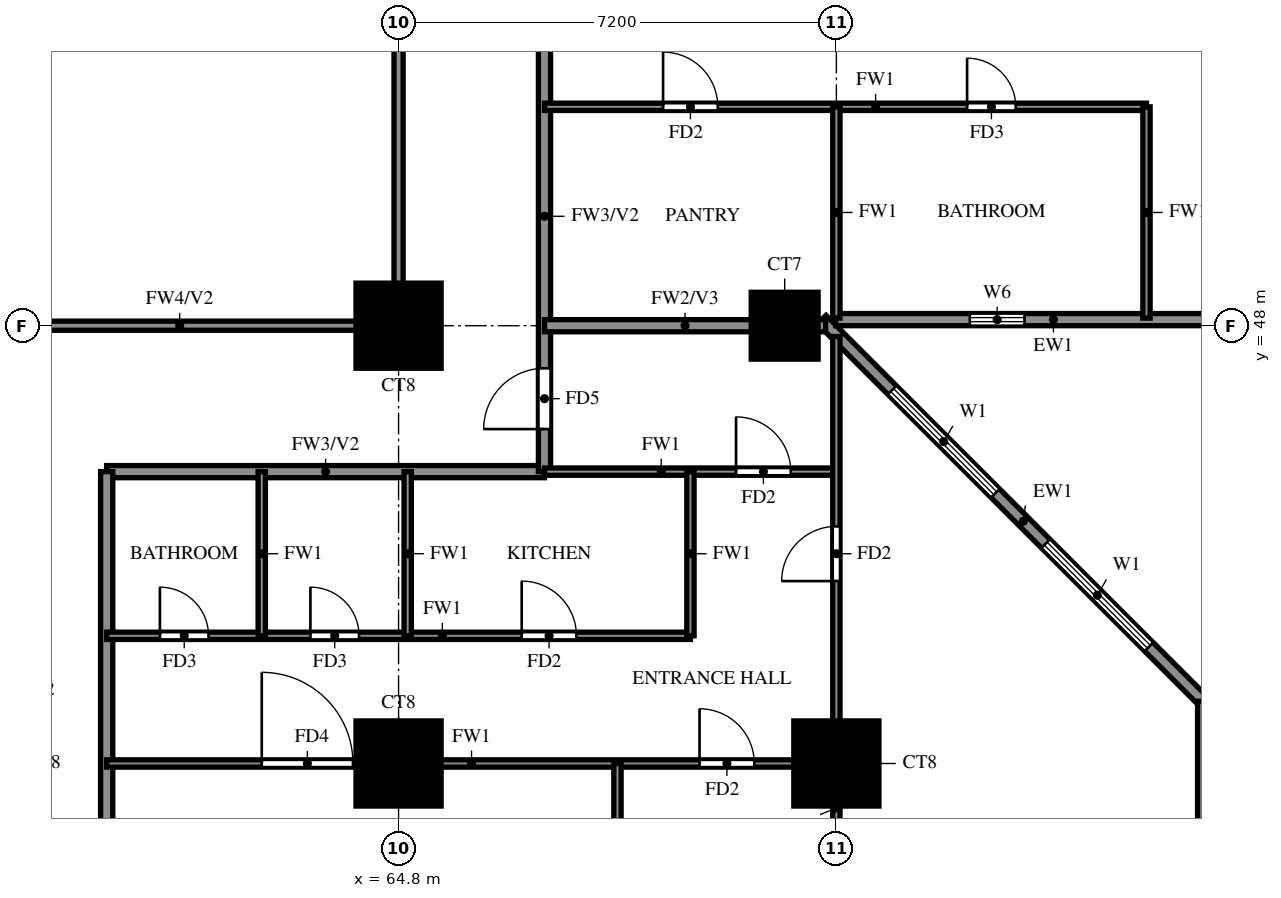
"""IFC4 building model, lengths in metres.
Left out: names, types, materials, properties, quantities, classifications, styles, units other than length and angle.
Written with IfcOpenShell. Run it as: python <this file> out.ifc"""

import sys

from ifc_helpers import new_model, si_unit, direction, frame, frame_2d, origin, origin_2d, place, context, subcontext, project, spatial, rectangle, extrude, source, transform, mapped, element, fill, save


model = new_model("IFC4")
c1 = context("Model", 3, precision=1e-05, world=origin(), true_north=direction((0.0, 1.0)))
c2 = subcontext(c1, "Body", "Model", "MODEL_VIEW")
j1 = project(units=[si_unit("LENGTHUNIT", "METRE"), si_unit("PLANEANGLEUNIT", "RADIAN")], contexts=[c1])
p1 = place(None, origin())
s1 = spatial("IfcSite", under=j1, at=p1, CompositionType="ELEMENT")
p2 = place(p1, origin())
s2 = spatial("IfcBuilding", under=s1, at=p2, CompositionType="ELEMENT")
p3 = place(p2, frame((0.0, 0.0, 55.0)))
s3 = spatial("IfcBuildingStorey", under=s2, at=p3, CompositionType="ELEMENT", Elevation=55.0)
m1 = source(origin(), c2, "Body", "SweptSolid", [
    extrude(rectangle(XDim=1.4, YDim=1.4, at=origin_2d()), origin(), (0.0, 0.0, 1.0), 3.18),
])
for number, where, z_axis, x_axis in (
    (1, (64.8, 40.8, 0.0), (0.0, 0.0, 1.0), (1.0, 0.0, 0.0)),
    (2, (72.0, 40.8, 0.0), (0.0, 0.0, 1.0), (1.0, 0.0, 0.0)),
    (3, (64.8, 48.0, 0.0), (0.0, 0.0, 1.0), (1.0, 0.0, 0.0)),
):
    element("IfcColumn", number, at=place(p3, frame(where, z_axis=z_axis, x_axis=x_axis)), inside=s3, PredefinedType="COLUMN", context=c2, shape_type="MappedRepresentation", body=[
        mapped(m1, transform((0.0, 0.0, 0.0))),
    ])
m2 = source(origin(), c2, "Body", "SweptSolid", [
    extrude(rectangle(XDim=1.1, YDim=1.1, at=origin_2d()), origin(), (0.0, 0.0, 1.0), 3.18),
])
p4 = place(p3, frame((71.15, 48.0, 0.0), z_axis=(0.0, 0.0, 1.0), x_axis=(1.0, 0.0, 0.0)))
e4 = element("IfcColumn", 4, at=p4, inside=s3, PredefinedType="COLUMN", context=c2, shape_type="MappedRepresentation", body=[
    mapped(m2, transform((0.0, 0.0, 0.0))),
])
p5 = place(p3, frame((78.74, 41.118, 0.0), z_axis=(0.0, 0.0, 1.0), x_axis=(-0.707106781187, 0.707106781187, 0.0)))
e5 = element("IfcWall", 5, at=p5, inside=s3, PredefinedType="SOLIDWALL", context=c2, shape_type="SweptSolid", body=[
    extrude(rectangle(XDim=9.874, YDim=0.2, at=frame_2d((4.937, 0.0))), origin(), (0.0, 0.0, 1.0), 3.18),
])
p6 = place(p5, frame((2.264, 0.0, 0.6)))
e6 = element("IfcOpeningElement", 6, at=p6, cuts=e5, PredefinedType="OPENING", context=c2, shape_type="SweptSolid", body=[
    extrude(rectangle(XDim=2.4, YDim=2.4, at=frame_2d((1.2, 1.2))), frame((0.0, 0.11, 0.0), z_axis=(0.0, -1.0, 0.0), x_axis=(1.0, 0.0, 0.0)), (0.0, 0.0, 1.0), 0.22),
])
p7 = place(p5, frame((5.836, 0.0, 0.6)))
e7 = element("IfcOpeningElement", 7, at=p7, cuts=e5, PredefinedType="OPENING", context=c2, shape_type="SweptSolid", body=[
    extrude(rectangle(XDim=2.4, YDim=2.4, at=frame_2d((1.2, 1.2))), frame((0.0, 0.11, 0.0), z_axis=(0.0, -1.0, 0.0), x_axis=(1.0, 0.0, 0.0)), (0.0, 0.0, 1.0), 0.22),
])
p8 = place(p3, frame((71.989, 48.1, 0.0), z_axis=(0.0, 0.0, 1.0), x_axis=(1.0, 0.0, 0.0)))
e8 = element("IfcWall", 8, at=p8, inside=s3, PredefinedType="SOLIDWALL", context=c2, shape_type="SweptSolid", body=[
    extrude(rectangle(XDim=6.511, YDim=0.2, at=frame_2d((3.256, 0.0))), origin(), (0.0, 0.0, 1.0), 3.18),
])
p9 = place(p8, frame((2.206, 0.0, 1.5)))
e9 = element("IfcOpeningElement", 9, at=p9, cuts=e8, PredefinedType="OPENING", context=c2, shape_type="SweptSolid", body=[
    extrude(rectangle(XDim=0.9, YDim=0.9, at=frame_2d((0.45, 0.45))), frame((0.0, 0.11, 0.0), z_axis=(0.0, -1.0, 0.0), x_axis=(1.0, 0.0, 0.0)), (0.0, 0.0, 1.0), 0.22),
])
p10 = place(p3, frame((60.0, 45.6, 0.0), z_axis=(0.0, 0.0, 1.0), x_axis=(1.0, 0.0, 0.0)))
e10 = element("IfcWall", 10, at=p10, inside=s3, PredefinedType="SOLIDWALL", context=c2, shape_type="SweptSolid", body=[
    extrude(rectangle(XDim=7.2, YDim=0.2, at=frame_2d((3.6, 0.0))), origin(), (0.0, 0.0, 1.0), 3.18),
])
p11 = place(p3, frame((60.0, 33.725, 0.0), z_axis=(0.0, 0.0, 1.0), x_axis=(0.0, 1.0, 0.0)))
e11 = element("IfcWall", 11, at=p11, inside=s3, PredefinedType="SOLIDWALL", context=c2, shape_type="SweptSolid", body=[
    extrude(rectangle(XDim=11.875, YDim=0.2, at=frame_2d((5.938, 0.0))), origin(), (0.0, 0.0, 1.0), 2.28),
])
p12 = place(p3, frame((67.2, 45.6, 0.0), z_axis=(0.0, 0.0, 1.0), x_axis=(0.0, 1.0, 0.0)))
e12 = element("IfcWall", 12, at=p12, inside=s3, PredefinedType="SOLIDWALL", context=c2, shape_type="SweptSolid", body=[
    extrude(rectangle(XDim=8.4, YDim=0.2, at=frame_2d((4.2, 0.0))), origin(), (0.0, 0.0, 1.0), 3.18),
])
p13 = place(p12, frame((0.7, 0.0, 0.0)))
e13 = element("IfcOpeningElement", 13, at=p13, cuts=e12, PredefinedType="OPENING", context=c2, shape_type="SweptSolid", body=[
    extrude(rectangle(XDim=1.0, YDim=2.1, at=frame_2d((0.5, 1.05))), frame((0.0, 0.11, 0.0), z_axis=(0.0, -1.0, 0.0), x_axis=(1.0, 0.0, 0.0)), (0.0, 0.0, 1.0), 0.22),
])
p14 = place(p3, frame((67.2, 48.0, 0.0), z_axis=(0.0, 0.0, 1.0), x_axis=(1.0, 0.0, 0.0)))
e14 = element("IfcWall", 14, at=p14, inside=s3, PredefinedType="SOLIDWALL", context=c2, shape_type="SweptSolid", body=[
    extrude(rectangle(XDim=4.623, YDim=0.2, at=frame_2d((2.312, 0.0))), origin(), (0.0, 0.0, 1.0), 3.18),
])
p15 = place(p3, frame((60.0, 40.8, 0.0), z_axis=(0.0, 0.0, 1.0), x_axis=(1.0, 0.0, 0.0)))
e15 = element("IfcWall", 15, at=p15, inside=s3, PredefinedType="PARTITIONING", context=c2, shape_type="SweptSolid", body=[
    extrude(rectangle(XDim=12.0, YDim=0.12, at=frame_2d((6.0, 0.0))), origin(), (0.0, 0.0, 1.0), 3.18),
])
p16 = place(p15, frame((9.75, 0.0, 0.0)))
e16 = element("IfcOpeningElement", 16, at=p16, cuts=e15, PredefinedType="OPENING", context=c2, shape_type="SweptSolid", body=[
    extrude(rectangle(XDim=0.9, YDim=2.1, at=frame_2d((0.45, 1.05))), frame((0.0, 0.07, 0.0), z_axis=(0.0, -1.0, 0.0), x_axis=(1.0, 0.0, 0.0)), (0.0, 0.0, 1.0), 0.14),
])
p17 = place(p15, frame((2.55, 0.0, 0.0)))
e17 = element("IfcOpeningElement", 17, at=p17, cuts=e15, PredefinedType="OPENING", context=c2, shape_type="SweptSolid", body=[
    extrude(rectangle(XDim=1.5, YDim=2.1, at=frame_2d((0.75, 1.05))), frame((0.0, 0.07, 0.0), z_axis=(0.0, -1.0, 0.0), x_axis=(1.0, 0.0, 0.0)), (0.0, 0.0, 1.0), 0.14),
])
p18 = place(p3, frame((60.0, 42.9, 0.0), z_axis=(0.0, 0.0, 1.0), x_axis=(1.0, 0.0, 0.0)))
e18 = element("IfcWall", 18, at=p18, inside=s3, PredefinedType="PARTITIONING", context=c2, shape_type="SweptSolid", body=[
    extrude(rectangle(XDim=9.6, YDim=0.12, at=frame_2d((4.8, 0.0))), origin(), (0.0, 0.0, 1.0), 3.18),
])
p19 = place(p18, frame((6.825, 0.0, 0.0)))
e19 = element("IfcOpeningElement", 19, at=p19, cuts=e18, PredefinedType="OPENING", context=c2, shape_type="SweptSolid", body=[
    extrude(rectangle(XDim=0.9, YDim=2.1, at=frame_2d((0.45, 1.05))), frame((0.0, 0.07, 0.0), z_axis=(0.0, -1.0, 0.0), x_axis=(1.0, 0.0, 0.0)), (0.0, 0.0, 1.0), 0.14),
])
p20 = place(p18, frame((3.35, 0.0, 0.0)))
e20 = element("IfcOpeningElement", 20, at=p20, cuts=e18, PredefinedType="OPENING", context=c2, shape_type="SweptSolid", body=[
    extrude(rectangle(XDim=0.8, YDim=2.1, at=frame_2d((0.4, 1.05))), frame((0.0, 0.07, 0.0), z_axis=(0.0, -1.0, 0.0), x_axis=(1.0, 0.0, 0.0)), (0.0, 0.0, 1.0), 0.14),
])
p21 = place(p18, frame((0.875, 0.0, 0.0)))
e21 = element("IfcOpeningElement", 21, at=p21, cuts=e18, PredefinedType="OPENING", context=c2, shape_type="SweptSolid", body=[
    extrude(rectangle(XDim=0.8, YDim=2.1, at=frame_2d((0.4, 1.05))), frame((0.0, 0.07, 0.0), z_axis=(0.0, -1.0, 0.0), x_axis=(1.0, 0.0, 0.0)), (0.0, 0.0, 1.0), 0.14),
])
p22 = place(p3, frame((67.2, 45.6, 0.0), z_axis=(0.0, 0.0, 1.0), x_axis=(1.0, 0.0, 0.0)))
e22 = element("IfcWall", 22, at=p22, inside=s3, PredefinedType="PARTITIONING", context=c2, shape_type="SweptSolid", body=[
    extrude(rectangle(XDim=4.8, YDim=0.12, at=frame_2d((2.4, 0.0))), origin(), (0.0, 0.0, 1.0), 3.18),
])
p23 = place(p22, frame((3.15, 0.0, 0.0)))
e23 = element("IfcOpeningElement", 23, at=p23, cuts=e22, PredefinedType="OPENING", context=c2, shape_type="SweptSolid", body=[
    extrude(rectangle(XDim=0.9, YDim=2.1, at=frame_2d((0.45, 1.05))), frame((0.0, 0.07, 0.0), z_axis=(0.0, -1.0, 0.0), x_axis=(1.0, 0.0, 0.0)), (0.0, 0.0, 1.0), 0.14),
])
p24 = place(p3, frame((67.2, 51.6, 0.0), z_axis=(0.0, 0.0, 1.0), x_axis=(1.0, 0.0, 0.0)))
e24 = element("IfcWall", 24, at=p24, inside=s3, PredefinedType="PARTITIONING", context=c2, shape_type="SweptSolid", body=[
    extrude(rectangle(XDim=9.9, YDim=0.12, at=frame_2d((4.95, 0.0))), origin(), (0.0, 0.0, 1.0), 3.18),
])
p25 = place(p24, frame((6.95, 0.0, 0.0)))
e25 = element("IfcOpeningElement", 25, at=p25, cuts=e24, PredefinedType="OPENING", context=c2, shape_type="SweptSolid", body=[
    extrude(rectangle(XDim=0.8, YDim=2.1, at=frame_2d((0.4, 1.05))), frame((0.0, 0.07, 0.0), z_axis=(0.0, -1.0, 0.0), x_axis=(1.0, 0.0, 0.0)), (0.0, 0.0, 1.0), 0.14),
])
p26 = place(p24, frame((1.95, 0.0, 0.0)))
e26 = element("IfcOpeningElement", 26, at=p26, cuts=e24, PredefinedType="OPENING", context=c2, shape_type="SweptSolid", body=[
    extrude(rectangle(XDim=0.9, YDim=2.1, at=frame_2d((0.45, 1.05))), frame((0.0, 0.07, 0.0), z_axis=(0.0, -1.0, 0.0), x_axis=(1.0, 0.0, 0.0)), (0.0, 0.0, 1.0), 0.14),
])
for number, where, z_axis, x_axis in (
    (27, (62.55, 42.9, 0.0), (0.0, 0.0, 1.0), (0.0, 1.0, 0.0)),
    (28, (64.95, 42.9, 0.0), (0.0, 0.0, 1.0), (0.0, 1.0, 0.0)),
):
    element("IfcWall", number, at=place(p3, frame(where, z_axis=z_axis, x_axis=x_axis)), inside=s3, PredefinedType="PARTITIONING", context=c2, shape_type="SweptSolid", body=[
        extrude(rectangle(XDim=2.7, YDim=0.12, at=frame_2d((1.35, 0.0))), origin(), (0.0, 0.0, 1.0), 3.18),
    ])
p27 = place(p3, frame((68.4, 33.725, 0.0), z_axis=(0.0, 0.0, 1.0), x_axis=(0.0, 1.0, 0.0)))
e29 = element("IfcWall", 29, at=p27, inside=s3, PredefinedType="PARTITIONING", context=c2, shape_type="SweptSolid", body=[
    extrude(rectangle(XDim=7.075, YDim=0.12, at=frame_2d((3.538, 0.0))), origin(), (0.0, 0.0, 1.0), 2.28),
])
p28 = place(p3, frame((69.6, 42.9, 0.0), z_axis=(0.0, 0.0, 1.0), x_axis=(0.0, 1.0, 0.0)))
e30 = element("IfcWall", 30, at=p28, inside=s3, PredefinedType="PARTITIONING", context=c2, shape_type="SweptSolid", body=[
    extrude(rectangle(XDim=2.7, YDim=0.12, at=frame_2d((1.35, 0.0))), origin(), (0.0, 0.0, 1.0), 3.18),
])
p29 = place(p3, frame((72.0, 33.725, 0.0), z_axis=(0.0, 0.0, 1.0), x_axis=(0.0, 1.0, 0.0)))
e31 = element("IfcWall", 31, at=p29, inside=s3, PredefinedType="PARTITIONING", context=c2, shape_type="SweptSolid", body=[
    extrude(rectangle(XDim=14.098, YDim=0.12, at=frame_2d((7.049, 0.0))), origin(), (0.0, 0.0, 1.0), 2.28),
])
p30 = place(p29, frame((10.075, 0.0, 0.0)))
e32 = element("IfcOpeningElement", 32, at=p30, cuts=e31, PredefinedType="OPENING", context=c2, shape_type="SweptSolid", body=[
    extrude(rectangle(XDim=0.9, YDim=2.1, at=frame_2d((0.45, 1.05))), frame((0.0, 0.07, 0.0), z_axis=(0.0, -1.0, 0.0), x_axis=(1.0, 0.0, 0.0)), (0.0, 0.0, 1.0), 0.14),
])
for number, where, z_axis, x_axis in (
    (33, (72.0, 48.125, 0.0), (0.0, 0.0, 1.0), (0.0, 1.0, 0.0)),
    (34, (77.1, 48.125, 0.0), (0.0, 0.0, 1.0), (0.0, 1.0, 0.0)),
):
    element("IfcWall", number, at=place(p3, frame(where, z_axis=z_axis, x_axis=x_axis)), inside=s3, PredefinedType="PARTITIONING", context=c2, shape_type="SweptSolid", body=[
        extrude(rectangle(XDim=3.475, YDim=0.12, at=frame_2d((1.738, 0.0))), origin(), (0.0, 0.0, 1.0), 3.18),
    ])
p31 = place(p3, frame((78.0, 33.725, 0.0), z_axis=(0.0, 0.0, 1.0), x_axis=(0.0, 1.0, 0.0)))
e35 = element("IfcWall", 35, at=p31, inside=s3, PredefinedType="PARTITIONING", context=c2, shape_type="SweptSolid", body=[
    extrude(rectangle(XDim=8.098, YDim=0.12, at=frame_2d((4.049, 0.0))), origin(), (0.0, 0.0, 1.0), 2.28),
])
p32 = place(p31, frame((3.599, 0.0, 0.0)))
e36 = element("IfcOpeningElement", 36, at=p32, cuts=e35, PredefinedType="OPENING", context=c2, shape_type="SweptSolid", body=[
    extrude(rectangle(XDim=0.9, YDim=2.1, at=frame_2d((0.45, 1.05))), frame((0.0, 0.07, 0.0), z_axis=(0.0, -1.0, 0.0), x_axis=(1.0, 0.0, 0.0)), (0.0, 0.0, 1.0), 0.14),
])
p33 = place(p3, frame((57.6, 48.0, 0.0), z_axis=(0.0, 0.0, 1.0), x_axis=(1.0, 0.0, 0.0)))
e37 = element("IfcWall", 37, at=p33, inside=s3, PredefinedType="SOLIDWALL", context=c2, shape_type="SweptSolid", body=[
    extrude(rectangle(XDim=7.2, YDim=0.15, at=frame_2d((3.6, 0.0))), origin(), (0.0, 0.0, 1.0), 2.28),
])
p34 = place(p3, frame((64.8, 48.0, 0.0), z_axis=(0.0, 0.0, 1.0), x_axis=(0.0, 1.0, 0.0)))
e38 = element("IfcWall", 38, at=p34, inside=s3, PredefinedType="SOLIDWALL", context=c2, shape_type="SweptSolid", body=[
    extrude(rectangle(XDim=14.4, YDim=0.15, at=frame_2d((7.2, 0.0))), origin(), (0.0, 0.0, 1.0), 2.28),
])
p35 = place(p6, origin())
e39 = element("IfcWindow", 39, at=p35, inside=s3, PartitioningType="DOUBLE_PANEL_VERTICAL", PredefinedType="WINDOW", context=c2, shape_type="SweptSolid", body=[
    extrude(rectangle(XDim=2.4, YDim=2.4, at=frame_2d((1.2, 1.2))), frame((0.0, 0.03, 0.0), z_axis=(0.0, -1.0, 0.0), x_axis=(1.0, 0.0, 0.0)), (0.0, 0.0, 1.0), 0.06),
])
fill(e6, e39)
p36 = place(p7, origin())
e40 = element("IfcWindow", 40, at=p36, inside=s3, PartitioningType="DOUBLE_PANEL_VERTICAL", PredefinedType="WINDOW", context=c2, shape_type="SweptSolid", body=[
    extrude(rectangle(XDim=2.4, YDim=2.4, at=frame_2d((1.2, 1.2))), frame((0.0, 0.03, 0.0), z_axis=(0.0, -1.0, 0.0), x_axis=(1.0, 0.0, 0.0)), (0.0, 0.0, 1.0), 0.06),
])
fill(e7, e40)
p37 = place(p9, origin())
e41 = element("IfcWindow", 41, at=p37, inside=s3, PartitioningType="SINGLE_PANEL", PredefinedType="WINDOW", context=c2, shape_type="SweptSolid", body=[
    extrude(rectangle(XDim=0.9, YDim=0.9, at=frame_2d((0.45, 0.45))), frame((0.0, 0.03, 0.0), z_axis=(0.0, -1.0, 0.0), x_axis=(1.0, 0.0, 0.0)), (0.0, 0.0, 1.0), 0.06),
])
fill(e9, e41)
p38 = place(p25, origin())
e42 = element("IfcDoor", 42, at=p38, inside=s3, OperationType="SINGLE_SWING_LEFT", PredefinedType="DOOR", context=c2, shape_type="SweptSolid", body=[
    extrude(rectangle(XDim=0.8, YDim=2.1, at=frame_2d((0.4, 1.05))), frame((0.0, 0.025, 0.0), z_axis=(0.0, -1.0, 0.0), x_axis=(1.0, 0.0, 0.0)), (0.0, 0.0, 1.0), 0.05),
])
fill(e25, e42)
p39 = place(p26, origin())
e43 = element("IfcDoor", 43, at=p39, inside=s3, OperationType="SINGLE_SWING_RIGHT", PredefinedType="DOOR", context=c2, shape_type="SweptSolid", body=[
    extrude(rectangle(XDim=0.9, YDim=2.1, at=frame_2d((0.45, 1.05))), frame((0.0, 0.025, 0.0), z_axis=(0.0, -1.0, 0.0), x_axis=(1.0, 0.0, 0.0)), (0.0, 0.0, 1.0), 0.05),
])
fill(e26, e43)
p40 = place(p23, origin())
e44 = element("IfcDoor", 44, at=p40, inside=s3, OperationType="SINGLE_SWING_LEFT", PredefinedType="DOOR", context=c2, shape_type="SweptSolid", body=[
    extrude(rectangle(XDim=0.9, YDim=2.1, at=frame_2d((0.45, 1.05))), frame((0.0, 0.025, 0.0), z_axis=(0.0, -1.0, 0.0), x_axis=(1.0, 0.0, 0.0)), (0.0, 0.0, 1.0), 0.05),
])
fill(e23, e44)
p41 = place(p13, origin())
e45 = element("IfcDoor", 45, at=p41, inside=s3, OperationType="SINGLE_SWING_RIGHT", PredefinedType="DOOR", context=c2, shape_type="SweptSolid", body=[
    extrude(rectangle(XDim=1.0, YDim=2.1, at=frame_2d((0.5, 1.05))), frame((0.0, 0.025, 0.0), z_axis=(0.0, -1.0, 0.0), x_axis=(1.0, 0.0, 0.0)), (0.0, 0.0, 1.0), 0.05),
])
fill(e13, e45)
p42 = place(p16, origin())
e46 = element("IfcDoor", 46, at=p42, inside=s3, OperationType="SINGLE_SWING_LEFT", PredefinedType="DOOR", context=c2, shape_type="SweptSolid", body=[
    extrude(rectangle(XDim=0.9, YDim=2.1, at=frame_2d((0.45, 1.05))), frame((0.0, 0.025, 0.0), z_axis=(0.0, -1.0, 0.0), x_axis=(1.0, 0.0, 0.0)), (0.0, 0.0, 1.0), 0.05),
])
fill(e16, e46)
p43 = place(p17, origin())
e47 = element("IfcDoor", 47, at=p43, inside=s3, OperationType="SINGLE_SWING_RIGHT", PredefinedType="DOOR", context=c2, shape_type="SweptSolid", body=[
    extrude(rectangle(XDim=1.5, YDim=2.1, at=frame_2d((0.75, 1.05))), frame((0.0, 0.025, 0.0), z_axis=(0.0, -1.0, 0.0), x_axis=(1.0, 0.0, 0.0)), (0.0, 0.0, 1.0), 0.05),
])
fill(e17, e47)
p44 = place(p19, origin())
e48 = element("IfcDoor", 48, at=p44, inside=s3, OperationType="SINGLE_SWING_RIGHT", PredefinedType="DOOR", context=c2, shape_type="SweptSolid", body=[
    extrude(rectangle(XDim=0.9, YDim=2.1, at=frame_2d((0.45, 1.05))), frame((0.0, 0.025, 0.0), z_axis=(0.0, -1.0, 0.0), x_axis=(1.0, 0.0, 0.0)), (0.0, 0.0, 1.0), 0.05),
])
fill(e19, e48)
p45 = place(p20, origin())
e49 = element("IfcDoor", 49, at=p45, inside=s3, OperationType="SINGLE_SWING_LEFT", PredefinedType="DOOR", context=c2, shape_type="SweptSolid", body=[
    extrude(rectangle(XDim=0.8, YDim=2.1, at=frame_2d((0.4, 1.05))), frame((0.0, 0.025, 0.0), z_axis=(0.0, -1.0, 0.0), x_axis=(1.0, 0.0, 0.0)), (0.0, 0.0, 1.0), 0.05),
])
fill(e20, e49)
p46 = place(p21, origin())
e50 = element("IfcDoor", 50, at=p46, inside=s3, OperationType="SINGLE_SWING_LEFT", PredefinedType="DOOR", context=c2, shape_type="SweptSolid", body=[
    extrude(rectangle(XDim=0.8, YDim=2.1, at=frame_2d((0.4, 1.05))), frame((0.0, 0.025, 0.0), z_axis=(0.0, -1.0, 0.0), x_axis=(1.0, 0.0, 0.0)), (0.0, 0.0, 1.0), 0.05),
])
fill(e21, e50)
p47 = place(p30, origin())
e51 = element("IfcDoor", 51, at=p47, inside=s3, OperationType="SINGLE_SWING_RIGHT", PredefinedType="DOOR", context=c2, shape_type="SweptSolid", body=[
    extrude(rectangle(XDim=0.9, YDim=2.1, at=frame_2d((0.45, 1.05))), frame((0.0, 0.025, 0.0), z_axis=(0.0, -1.0, 0.0), x_axis=(1.0, 0.0, 0.0)), (0.0, 0.0, 1.0), 0.05),
])
fill(e32, e51)
save(model, sys.argv[1])
